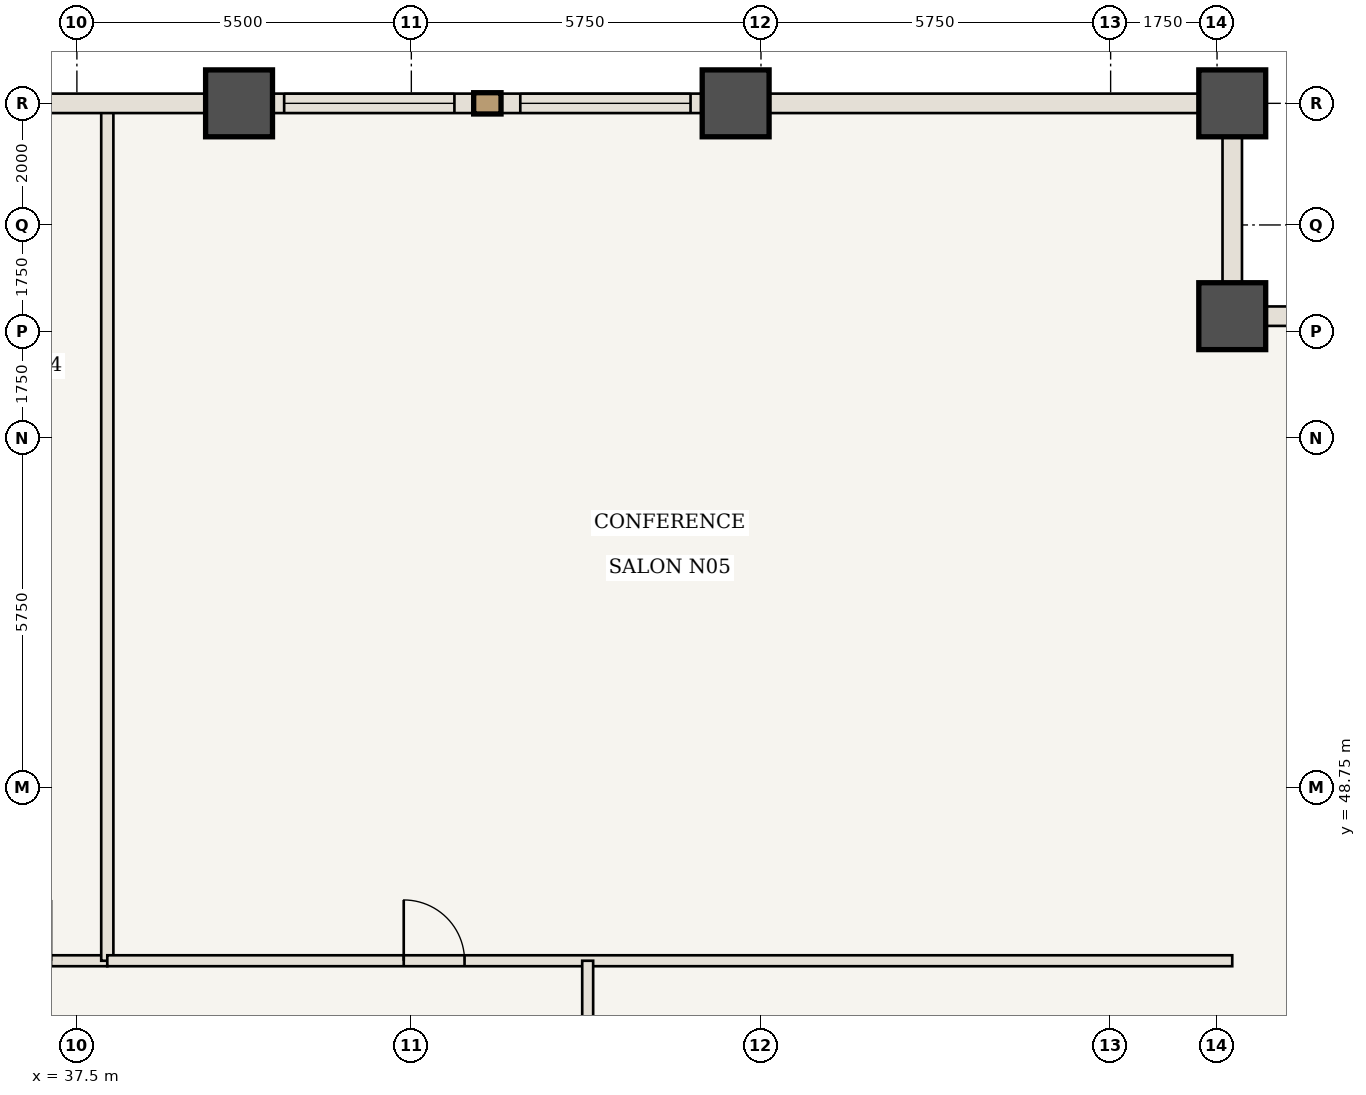
"""IFC4 building model, lengths in metres.
Left out: names, types, materials, properties, quantities, classifications, styles, units other than length and angle.
Written with IfcOpenShell. Run it as: python <this file> out.ifc"""

import sys

from ifc_helpers import new_model, si_unit, direction, frame, frame_2d, origin, origin_2d, place, context, subcontext, project, spatial, rectangle, extrude, element, fill, save


model = new_model("IFC4")
c1 = context("Model", 3, precision=1e-05, world=origin(), true_north=direction((0.0, 1.0)))
c2 = subcontext(c1, "Body", "Model", "MODEL_VIEW")
j1 = project(units=[si_unit("LENGTHUNIT", "METRE"), si_unit("PLANEANGLEUNIT", "RADIAN")], contexts=[c1])
p1 = place(None, origin())
s1 = spatial("IfcSite", under=j1, at=p1, CompositionType="ELEMENT")
p2 = place(p1, origin())
s2 = spatial("IfcBuilding", under=s1, at=p2, CompositionType="ELEMENT")
p3 = place(p2, frame((0.0, 0.0, 49.35)))
s3 = spatial("IfcBuildingStorey", under=s2, at=p3, CompositionType="ELEMENT", Elevation=49.35)
for number, where, z_axis, x_axis in (
    (1, (56.5, 56.5, 0.0), (0.0, 0.0, 1.0), (1.0, 0.0, 0.0)),
    (2, (56.5, 60.0, 0.0), (0.0, 0.0, 1.0), (1.0, 0.0, 0.0)),
    (3, (40.167, 60.0, 0.0), (0.0, 0.0, 1.0), (1.0, 0.0, 0.0)),
    (4, (48.333, 60.0, 0.0), (0.0, 0.0, 1.0), (1.0, 0.0, 0.0)),
):
    element("IfcColumn", number, at=place(p3, frame(where, z_axis=z_axis, x_axis=x_axis)), inside=s3, PredefinedType="COLUMN", context=c2, shape_type="SweptSolid", body=[
        extrude(rectangle(XDim=1.1, YDim=1.1, at=origin_2d()), origin(), (0.0, 0.0, 1.0), 3.5),
    ])
p4 = place(p3, frame((33.3, 45.9, 0.0), z_axis=(0.0, 0.0, 1.0), x_axis=(1.0, 0.0, 0.0)))
e5 = element("IfcWall", 5, at=p4, inside=s3, PredefinedType="STANDARD", context=c2, shape_type="SweptSolid", body=[
    extrude(rectangle(XDim=4.7, YDim=0.18, at=frame_2d((2.35, 0.0))), origin(), (0.0, 0.0, 1.0), 3.32),
])
p5 = place(p4, frame((2.775, 0.0, 0.0)))
e6 = element("IfcOpeningElement", 6, at=p5, cuts=e5, PredefinedType="OPENING", context=c2, shape_type="SweptSolid", body=[
    extrude(rectangle(XDim=1.0, YDim=2.15, at=frame_2d((0.5, 1.075))), frame((0.0, 0.1, 0.0), z_axis=(0.0, -1.0, 0.0), x_axis=(1.0, 0.0, 0.0)), (0.0, 0.0, 1.0), 0.2),
])
p6 = place(p3, frame((38.0, 45.9, 0.0), z_axis=(0.0, 0.0, 1.0), x_axis=(0.0, 1.0, 0.0)))
e7 = element("IfcWall", 7, at=p6, inside=s3, PredefinedType="STANDARD", context=c2, shape_type="SweptSolid", body=[
    extrude(rectangle(XDim=14.04, YDim=0.2, at=frame_2d((7.02, 0.0))), origin(), (0.0, 0.0, 1.0), 3.32),
])
p7 = place(p3, frame((38.0, 45.9, 0.0), z_axis=(0.0, 0.0, 1.0), x_axis=(1.0, 0.0, 0.0)))
e8 = element("IfcWall", 8, at=p7, inside=s3, PredefinedType="STANDARD", context=c2, shape_type="SweptSolid", body=[
    extrude(rectangle(XDim=18.5, YDim=0.18, at=frame_2d((9.25, 0.0))), origin(), (0.0, 0.0, 1.0), 3.32),
])
p8 = place(p7, frame((4.875, 0.0, 0.0)))
e9 = element("IfcOpeningElement", 9, at=p8, cuts=e8, PredefinedType="OPENING", context=c2, shape_type="SweptSolid", body=[
    extrude(rectangle(XDim=1.0, YDim=2.15, at=frame_2d((0.5, 1.075))), frame((0.0, 0.1, 0.0), z_axis=(0.0, -1.0, 0.0), x_axis=(1.0, 0.0, 0.0)), (0.0, 0.0, 1.0), 0.2),
])
p9 = place(p3, frame((45.9, 37.6, 0.0), z_axis=(0.0, 0.0, 1.0), x_axis=(0.0, 1.0, 0.0)))
e10 = element("IfcWall", 10, at=p9, inside=s3, PredefinedType="STANDARD", context=c2, shape_type="SweptSolid", body=[
    extrude(rectangle(XDim=8.3, YDim=0.18, at=frame_2d((4.15, 0.0))), origin(), (0.0, 0.0, 1.0), 3.32),
])
p10 = place(p9, frame((3.65, 0.0, 0.0)))
e11 = element("IfcOpeningElement", 11, at=p10, cuts=e10, PredefinedType="OPENING", context=c2, shape_type="SweptSolid", body=[
    extrude(rectangle(XDim=1.0, YDim=2.15, at=frame_2d((0.5, 1.075))), frame((0.0, 0.1, 0.0), z_axis=(0.0, -1.0, 0.0), x_axis=(1.0, 0.0, 0.0)), (0.0, 0.0, 1.0), 0.2),
])
p11 = place(p3, frame((32.0, 60.0, 0.0), z_axis=(0.0, 0.0, 1.0), x_axis=(1.0, 0.0, 0.0)))
e12 = element("IfcWall", 12, at=p11, inside=s3, PredefinedType="USERDEFINED", context=c2, shape_type="SweptSolid", body=[
    extrude(rectangle(XDim=8.167, YDim=0.32, at=frame_2d((4.083, 0.0))), origin(), (0.0, 0.0, 1.0), 2.52),
])
p12 = place(p11, frame((2.45, 0.0, 0.85)))
e13 = element("IfcOpeningElement", 13, at=p12, cuts=e12, PredefinedType="OPENING", context=c2, shape_type="SweptSolid", body=[
    extrude(rectangle(XDim=2.4, YDim=1.47, at=frame_2d((1.2, 0.735))), frame((0.0, 0.17, 0.0), z_axis=(0.0, -1.0, 0.0), x_axis=(1.0, 0.0, 0.0)), (0.0, 0.0, 1.0), 0.34),
])
p13 = place(p3, frame((40.167, 60.0, 0.0), z_axis=(0.0, 0.0, 1.0), x_axis=(1.0, 0.0, 0.0)))
e14 = element("IfcWall", 14, at=p13, inside=s3, PredefinedType="USERDEFINED", context=c2, shape_type="SweptSolid", body=[
    extrude(rectangle(XDim=8.167, YDim=0.32, at=frame_2d((4.083, 0.0))), origin(), (0.0, 0.0, 1.0), 2.52),
])
p14 = place(p13, frame((0.742, 0.0, 0.85)))
e15 = element("IfcOpeningElement", 15, at=p14, cuts=e14, PredefinedType="OPENING", context=c2, shape_type="SweptSolid", body=[
    extrude(rectangle(XDim=2.8, YDim=1.47, at=frame_2d((1.4, 0.735))), frame((0.0, 0.17, 0.0), z_axis=(0.0, -1.0, 0.0), x_axis=(1.0, 0.0, 0.0)), (0.0, 0.0, 1.0), 0.34),
])
p15 = place(p13, frame((4.625, 0.0, 0.85)))
e16 = element("IfcOpeningElement", 16, at=p15, cuts=e14, PredefinedType="OPENING", context=c2, shape_type="SweptSolid", body=[
    extrude(rectangle(XDim=2.8, YDim=1.47, at=frame_2d((1.4, 0.735))), frame((0.0, 0.17, 0.0), z_axis=(0.0, -1.0, 0.0), x_axis=(1.0, 0.0, 0.0)), (0.0, 0.0, 1.0), 0.34),
])
p16 = place(p3, frame((48.333, 60.0, 0.0), z_axis=(0.0, 0.0, 1.0), x_axis=(1.0, 0.0, 0.0)))
e17 = element("IfcWall", 17, at=p16, inside=s3, PredefinedType="USERDEFINED", context=c2, shape_type="SweptSolid", body=[
    extrude(rectangle(XDim=8.167, YDim=0.32, at=frame_2d((4.083, 0.0))), origin(), (0.0, 0.0, 1.0), 2.52),
])
for number, where, z_axis, x_axis in (
    (18, (56.5, 56.5, 0.0), (0.0, 0.0, 1.0), (1.0, 0.0, 0.0)),
    (19, (56.5, 60.0, 0.0), (0.0, 0.0, 1.0), (0.0, -1.0, 0.0)),
):
    element("IfcWall", number, at=place(p3, frame(where, z_axis=z_axis, x_axis=x_axis)), inside=s3, PredefinedType="USERDEFINED", context=c2, shape_type="SweptSolid", body=[
        extrude(rectangle(XDim=3.5, YDim=0.32, at=frame_2d((1.75, 0.0))), origin(), (0.0, 0.0, 1.0), 2.52),
    ])
p17 = place(p8, origin())
e20 = element("IfcDoor", 20, at=p17, inside=s3, OperationType="SINGLE_SWING_LEFT", PredefinedType="DOOR", context=c2, shape_type="SweptSolid", body=[
    extrude(rectangle(XDim=1.0, YDim=2.15, at=frame_2d((0.5, 1.075))), frame((0.0, 0.025, 0.0), z_axis=(0.0, -1.0, 0.0), x_axis=(1.0, 0.0, 0.0)), (0.0, 0.0, 1.0), 0.05),
])
fill(e9, e20)
p18 = place(p14, origin())
e21 = element("IfcWindow", 21, at=p18, inside=s3, PartitioningType="SINGLE_PANEL", PredefinedType="WINDOW", context=c2, shape_type="SweptSolid", body=[
    extrude(rectangle(XDim=2.8, YDim=1.47, at=frame_2d((1.4, 0.735))), frame((0.0, 0.03, 0.0), z_axis=(0.0, -1.0, 0.0), x_axis=(1.0, 0.0, 0.0)), (0.0, 0.0, 1.0), 0.06),
])
fill(e15, e21)
p19 = place(p15, origin())
e22 = element("IfcWindow", 22, at=p19, inside=s3, PartitioningType="SINGLE_PANEL", PredefinedType="WINDOW", context=c2, shape_type="SweptSolid", body=[
    extrude(rectangle(XDim=2.8, YDim=1.47, at=frame_2d((1.4, 0.735))), frame((0.0, 0.03, 0.0), z_axis=(0.0, -1.0, 0.0), x_axis=(1.0, 0.0, 0.0)), (0.0, 0.0, 1.0), 0.06),
])
fill(e16, e22)
save(model, sys.argv[1])
